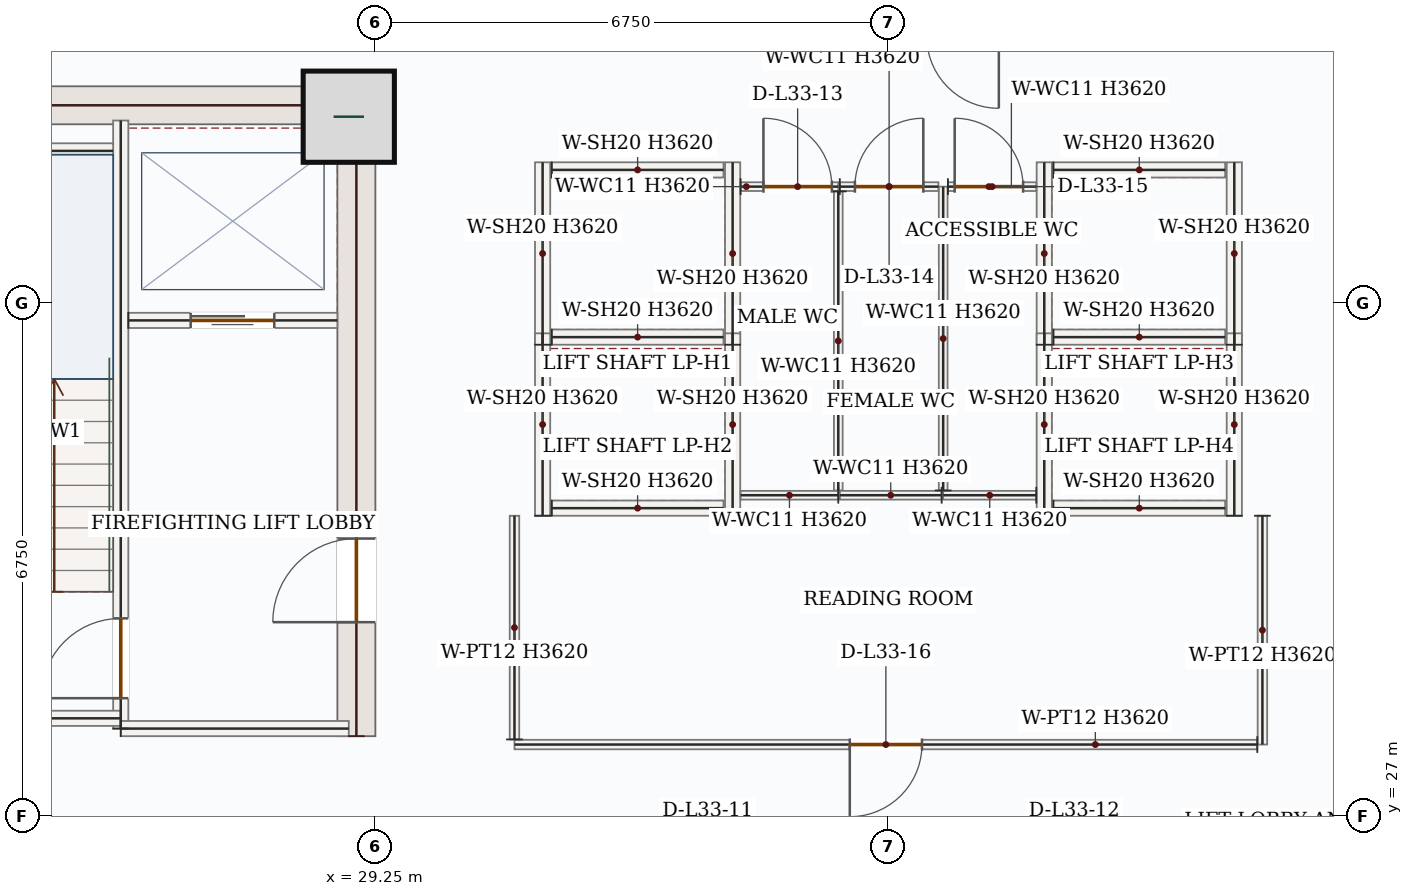
"""IFC4 building model, lengths in metres.
Left out: names, types, materials, properties, quantities, classifications, styles, units other than length and angle.
Written with IfcOpenShell. Run it as: python <this file> out.ifc"""

import sys

from ifc_helpers import new_model, si_unit, direction, frame, frame_2d, origin, origin_2d, place, context, subcontext, project, spatial, rectangle, extrude, source, transform, mapped, element, fill, save


model = new_model("IFC4")
c1 = context("Model", 3, precision=1e-05, world=origin(), true_north=direction((0.0, 1.0)))
c2 = subcontext(c1, "Body", "Model", "MODEL_VIEW")
j1 = project(units=[si_unit("LENGTHUNIT", "METRE"), si_unit("PLANEANGLEUNIT", "RADIAN")], contexts=[c1])
p1 = place(None, origin())
s1 = spatial("IfcSite", under=j1, at=p1, CompositionType="ELEMENT")
p2 = place(p1, origin())
s2 = spatial("IfcBuilding", under=s1, at=p2, CompositionType="ELEMENT")
p3 = place(p2, frame((0.0, 0.0, 147.3)))
s3 = spatial("IfcBuildingStorey", under=s2, at=p3, CompositionType="ELEMENT", Elevation=147.3)
p4 = place(p3, frame((29.0, 28.05, 0.0), z_axis=(0.0, 0.0, 1.0), x_axis=(0.0, 1.0, 0.0)))
e1 = element("IfcWall", 1, at=p4, inside=s3, PredefinedType="SHEAR", context=c2, shape_type="SweptSolid", body=[
    extrude(rectangle(XDim=8.55, YDim=0.5, at=frame_2d((4.275, 0.0))), origin(), (0.0, 0.0, 1.0), 3.62),
])
p5 = place(p4, frame((1.5, 0.0, 0.0)))
e2 = element("IfcOpeningElement", 2, at=p5, cuts=e1, PredefinedType="OPENING", context=c2, shape_type="SweptSolid", body=[
    extrude(rectangle(XDim=1.1, YDim=2.2, at=frame_2d((0.55, 1.1))), frame((0.0, 0.26, 0.0), z_axis=(0.0, -1.0, 0.0), x_axis=(1.0, 0.0, 0.0)), (0.0, 0.0, 1.0), 0.52),
])
m1 = source(origin(), c2, "Body", "SweptSolid", [
    extrude(rectangle(XDim=7.0, YDim=0.5, at=frame_2d((3.5, 0.0))), origin(), (0.0, 0.0, 1.0), 3.62),
])
p6 = place(p3, frame((21.75, 36.35, 0.0), z_axis=(0.0, 0.0, 1.0), x_axis=(1.0, 0.0, 0.0)))
e3 = element("IfcWall", 3, at=p6, inside=s3, PredefinedType="SHEAR", context=c2, shape_type="MappedRepresentation", body=[
    mapped(m1, transform((0.0, 0.0, 0.0), x_axis=(1.0, 0.0, 0.0), y_axis=(0.0, 1.0, 0.0), z_axis=(0.0, 0.0, 1.0), scale=1.0)),
])
m2 = source(origin(), c2, "Body", "SweptSolid", [
    extrude(rectangle(XDim=1.2, YDim=1.2, at=origin_2d()), origin(), (0.0, 0.0, 1.0), 3.9),
])
p7 = place(p3, frame((28.9, 36.2, 0.0), z_axis=(0.0, 0.0, 1.0), x_axis=(1.0, 0.0, 0.0)))
e4 = element("IfcColumn", 4, at=p7, inside=s3, PredefinedType="COLUMN", context=c2, shape_type="MappedRepresentation", body=[
    mapped(m2, transform((0.0, 0.0, 0.0), x_axis=(1.0, 0.0, 0.0), y_axis=(0.0, 1.0, 0.0), z_axis=(0.0, 0.0, 1.0), scale=1.0)),
])
p8 = place(p3, frame((25.9, 28.15, 0.0), z_axis=(0.0, 0.0, 1.0), x_axis=(0.0, 1.0, 0.0)))
e5 = element("IfcWall", 5, at=p8, inside=s3, PredefinedType="SOLIDWALL", context=c2, shape_type="SweptSolid", body=[
    extrude(rectangle(XDim=8.0, YDim=0.2, at=frame_2d((4.0, 0.0))), origin(), (0.0, 0.0, 1.0), 3.62),
])
p9 = place(p8, frame((0.4, 0.0, 0.0)))
e6 = element("IfcOpeningElement", 6, at=p9, cuts=e5, PredefinedType="OPENING", context=c2, shape_type="SweptSolid", body=[
    extrude(rectangle(XDim=1.05, YDim=2.15, at=frame_2d((0.525, 1.075))), frame((0.0, 0.11, 0.0), z_axis=(0.0, -1.0, 0.0), x_axis=(1.0, 0.0, 0.0)), (0.0, 0.0, 1.0), 0.22),
])
m3 = source(origin(), c2, "Body", "SweptSolid", [
    extrude(rectangle(XDim=4.25, YDim=0.2, at=frame_2d((2.125, 0.0))), origin(), (0.0, 0.0, 1.0), 3.62),
])
p10 = place(p3, frame((21.65, 28.285, 0.0), z_axis=(0.0, 0.0, 1.0), x_axis=(1.0, 0.0, 0.0)))
e7 = element("IfcWall", 7, at=p10, inside=s3, PredefinedType="SOLIDWALL", context=c2, shape_type="MappedRepresentation", body=[
    mapped(m3, transform((0.0, 0.0, 0.0), x_axis=(1.0, 0.0, 0.0), y_axis=(0.0, 1.0, 0.0), z_axis=(0.0, 0.0, 1.0), scale=1.0)),
])
m4 = source(origin(), c2, "Body", "SweptSolid", [
    extrude(rectangle(XDim=3.0, YDim=0.2, at=frame_2d((1.5, 0.0))), origin(), (0.0, 0.0, 1.0), 3.62),
])
p11 = place(p3, frame((25.9, 28.15, 0.0), z_axis=(0.0, 0.0, 1.0), x_axis=(1.0, 0.0, 0.0)))
e8 = element("IfcWall", 8, at=p11, inside=s3, PredefinedType="SOLIDWALL", context=c2, shape_type="MappedRepresentation", body=[
    mapped(m4, transform((0.0, 0.0, 0.0), x_axis=(1.0, 0.0, 0.0), y_axis=(0.0, 1.0, 0.0), z_axis=(0.0, 0.0, 1.0), scale=1.0)),
])
m5 = source(origin(), c2, "Body", "SweptSolid", [
    extrude(rectangle(XDim=3.25, YDim=0.2, at=frame_2d((1.625, 0.0))), origin(), (0.0, 0.0, 1.0), 3.62),
])
p12 = place(p3, frame((22.55, 35.75, 0.0), z_axis=(0.0, 0.0, 1.0), x_axis=(1.0, 0.0, 0.0)))
e9 = element("IfcWall", 9, at=p12, inside=s3, PredefinedType="SOLIDWALL", context=c2, shape_type="MappedRepresentation", body=[
    mapped(m5, transform((0.0, 0.0, 0.0), x_axis=(1.0, 0.0, 0.0), y_axis=(0.0, 1.0, 0.0), z_axis=(0.0, 0.0, 1.0), scale=1.0)),
])
p13 = place(p3, frame((26.0, 33.52, 0.0), z_axis=(0.0, 0.0, 1.0), x_axis=(1.0, 0.0, 0.0)))
e10 = element("IfcWall", 10, at=p13, inside=s3, PredefinedType="SOLIDWALL", context=c2, shape_type="SweptSolid", body=[
    extrude(rectangle(XDim=2.75, YDim=0.2, at=frame_2d((1.375, 0.0))), origin(), (0.0, 0.0, 1.0), 3.62),
])
p14 = place(p13, frame((0.82, 0.0, 0.0)))
e11 = element("IfcOpeningElement", 11, at=p14, cuts=e10, PredefinedType="OPENING", context=c2, shape_type="SweptSolid", body=[
    extrude(rectangle(XDim=1.1, YDim=2.15, at=frame_2d((0.55, 1.075))), frame((0.0, 0.11, 0.0), z_axis=(0.0, -1.0, 0.0), x_axis=(1.0, 0.0, 0.0)), (0.0, 0.0, 1.0), 0.22),
])
m6 = source(origin(), c2, "Body", "SweptSolid", [
    extrude(rectangle(XDim=2.4, YDim=0.2, at=frame_2d((1.2, 0.0))), origin(), (0.0, 0.0, 1.0), 3.62),
])
for number, where, z_axis, x_axis in (
    (12, (31.45, 33.2, 0.0), (0.0, 0.0, 1.0), (0.0, 1.0, 0.0)),
    (13, (33.95, 33.2, 0.0), (0.0, 0.0, 1.0), (0.0, 1.0, 0.0)),
):
    element("IfcWall", number, at=place(p3, frame(where, z_axis=z_axis, x_axis=x_axis)), inside=s3, PredefinedType="SOLIDWALL", context=c2, shape_type="MappedRepresentation", body=[
        mapped(m6, transform((0.0, 0.0, 0.0), x_axis=(1.0, 0.0, 0.0), y_axis=(0.0, 1.0, 0.0), z_axis=(0.0, 0.0, 1.0), scale=1.0)),
    ])
m7 = source(origin(), c2, "Body", "SweptSolid", [
    extrude(rectangle(XDim=2.26, YDim=0.2, at=frame_2d((1.13, 0.0))), origin(), (0.0, 0.0, 1.0), 3.62),
])
for number, where, z_axis, x_axis in (
    (14, (31.57, 33.3, 0.0), (0.0, 0.0, 1.0), (1.0, 0.0, 0.0)),
    (15, (31.57, 35.5, 0.0), (0.0, 0.0, 1.0), (1.0, 0.0, 0.0)),
):
    element("IfcWall", number, at=place(p3, frame(where, z_axis=z_axis, x_axis=x_axis)), inside=s3, PredefinedType="SOLIDWALL", context=c2, shape_type="MappedRepresentation", body=[
        mapped(m7, transform((0.0, 0.0, 0.0), x_axis=(1.0, 0.0, 0.0), y_axis=(0.0, 1.0, 0.0), z_axis=(0.0, 0.0, 1.0), scale=1.0)),
    ])
for number, where, z_axis, x_axis in (
    (16, (31.45, 30.95, 0.0), (0.0, 0.0, 1.0), (0.0, 1.0, 0.0)),
    (17, (33.95, 30.95, 0.0), (0.0, 0.0, 1.0), (0.0, 1.0, 0.0)),
):
    element("IfcWall", number, at=place(p3, frame(where, z_axis=z_axis, x_axis=x_axis)), inside=s3, PredefinedType="SOLIDWALL", context=c2, shape_type="MappedRepresentation", body=[
        mapped(m6, transform((0.0, 0.0, 0.0), x_axis=(1.0, 0.0, 0.0), y_axis=(0.0, 1.0, 0.0), z_axis=(0.0, 0.0, 1.0), scale=1.0)),
    ])
p15 = place(p3, frame((31.57, 31.05, 0.0), z_axis=(0.0, 0.0, 1.0), x_axis=(1.0, 0.0, 0.0)))
e18 = element("IfcWall", 18, at=p15, inside=s3, PredefinedType="SOLIDWALL", context=c2, shape_type="MappedRepresentation", body=[
    mapped(m7, transform((0.0, 0.0, 0.0), x_axis=(1.0, 0.0, 0.0), y_axis=(0.0, 1.0, 0.0), z_axis=(0.0, 0.0, 1.0), scale=1.0)),
])
for number, where, z_axis, x_axis in (
    (19, (38.05, 33.2, 0.0), (0.0, 0.0, 1.0), (0.0, 1.0, 0.0)),
    (20, (40.55, 33.2, 0.0), (0.0, 0.0, 1.0), (0.0, 1.0, 0.0)),
):
    element("IfcWall", number, at=place(p3, frame(where, z_axis=z_axis, x_axis=x_axis)), inside=s3, PredefinedType="SOLIDWALL", context=c2, shape_type="MappedRepresentation", body=[
        mapped(m6, transform((0.0, 0.0, 0.0), x_axis=(1.0, 0.0, 0.0), y_axis=(0.0, 1.0, 0.0), z_axis=(0.0, 0.0, 1.0), scale=1.0)),
    ])
for number, where, z_axis, x_axis in (
    (21, (38.17, 33.3, 0.0), (0.0, 0.0, 1.0), (1.0, 0.0, 0.0)),
    (22, (38.17, 35.5, 0.0), (0.0, 0.0, 1.0), (1.0, 0.0, 0.0)),
):
    element("IfcWall", number, at=place(p3, frame(where, z_axis=z_axis, x_axis=x_axis)), inside=s3, PredefinedType="SOLIDWALL", context=c2, shape_type="MappedRepresentation", body=[
        mapped(m7, transform((0.0, 0.0, 0.0), x_axis=(1.0, 0.0, 0.0), y_axis=(0.0, 1.0, 0.0), z_axis=(0.0, 0.0, 1.0), scale=1.0)),
    ])
for number, where, z_axis, x_axis in (
    (23, (38.05, 30.95, 0.0), (0.0, 0.0, 1.0), (0.0, 1.0, 0.0)),
    (24, (40.55, 30.95, 0.0), (0.0, 0.0, 1.0), (0.0, 1.0, 0.0)),
):
    element("IfcWall", number, at=place(p3, frame(where, z_axis=z_axis, x_axis=x_axis)), inside=s3, PredefinedType="SOLIDWALL", context=c2, shape_type="MappedRepresentation", body=[
        mapped(m6, transform((0.0, 0.0, 0.0), x_axis=(1.0, 0.0, 0.0), y_axis=(0.0, 1.0, 0.0), z_axis=(0.0, 0.0, 1.0), scale=1.0)),
    ])
p16 = place(p3, frame((38.17, 31.05, 0.0), z_axis=(0.0, 0.0, 1.0), x_axis=(1.0, 0.0, 0.0)))
e25 = element("IfcWall", 25, at=p16, inside=s3, PredefinedType="SOLIDWALL", context=c2, shape_type="MappedRepresentation", body=[
    mapped(m7, transform((0.0, 0.0, 0.0), x_axis=(1.0, 0.0, 0.0), y_axis=(0.0, 1.0, 0.0), z_axis=(0.0, 0.0, 1.0), scale=1.0)),
])
m8 = source(origin(), c2, "Body", "SweptSolid", [
    extrude(rectangle(XDim=1.225, YDim=0.115, at=frame_2d((0.613, 0.0))), origin(), (0.0, 0.0, 1.0), 3.62),
])
p17 = place(p3, frame((37.945, 31.22, 0.0), z_axis=(0.0, 0.0, 1.0), x_axis=(-1.0, 0.0, 0.0)))
e26 = element("IfcWall", 26, at=p17, inside=s3, PredefinedType="PARTITIONING", context=c2, shape_type="MappedRepresentation", body=[
    mapped(m8, transform((0.0, 0.0, 0.0), x_axis=(1.0, 0.0, 0.0), y_axis=(0.0, 1.0, 0.0), z_axis=(0.0, 0.0, 1.0), scale=1.0)),
])
m9 = source(origin(), c2, "Body", "SweptSolid", [
    extrude(rectangle(XDim=3.998, YDim=0.115, at=frame_2d((1.999, 0.0))), origin(), (0.0, 0.0, 1.0), 3.62),
])
p18 = place(p3, frame((36.72, 31.282, 0.0), z_axis=(0.0, 0.0, 1.0), x_axis=(0.0, 1.0, 0.0)))
e27 = element("IfcWall", 27, at=p18, inside=s3, PredefinedType="PARTITIONING", context=c2, shape_type="MappedRepresentation", body=[
    mapped(m9, transform((0.0, 0.0, 0.0), x_axis=(1.0, 0.0, 0.0), y_axis=(0.0, 1.0, 0.0), z_axis=(0.0, 0.0, 1.0), scale=1.0)),
])
p19 = place(p3, frame((36.782, 35.28, 0.0), z_axis=(0.0, 0.0, 1.0), x_axis=(1.0, 0.0, 0.0)))
e28 = element("IfcWall", 28, at=p19, inside=s3, PredefinedType="PARTITIONING", context=c2, shape_type="SweptSolid", body=[
    extrude(rectangle(XDim=1.163, YDim=0.115, at=frame_2d((0.581, 0.0))), origin(), (0.0, 0.0, 1.0), 3.62),
])
p20 = place(p19, frame((0.089, 0.0, 0.0)))
e29 = element("IfcOpeningElement", 29, at=p20, cuts=e28, PredefinedType="OPENING", context=c2, shape_type="SweptSolid", body=[
    extrude(rectangle(XDim=0.9, YDim=2.1, at=frame_2d((0.45, 1.05))), frame((0.0, 0.067, 0.0), z_axis=(0.0, -1.0, 0.0), x_axis=(1.0, 0.0, 0.0)), (0.0, 0.0, 1.0), 0.135),
])
m10 = source(origin(), c2, "Body", "SweptSolid", [
    extrude(rectangle(XDim=1.285, YDim=0.115, at=frame_2d((0.643, 0.0))), origin(), (0.0, 0.0, 1.0), 3.62),
])
p21 = place(p3, frame((35.34, 31.22, 0.0), z_axis=(0.0, 0.0, 1.0), x_axis=(-1.0, 0.0, 0.0)))
e30 = element("IfcWall", 30, at=p21, inside=s3, PredefinedType="PARTITIONING", context=c2, shape_type="MappedRepresentation", body=[
    mapped(m10, transform((0.0, 0.0, 0.0), x_axis=(1.0, 0.0, 0.0), y_axis=(0.0, 1.0, 0.0), z_axis=(0.0, 0.0, 1.0), scale=1.0)),
])
p22 = place(p3, frame((34.055, 35.28, 0.0), z_axis=(0.0, 0.0, 1.0), x_axis=(1.0, 0.0, 0.0)))
e31 = element("IfcWall", 31, at=p22, inside=s3, PredefinedType="PARTITIONING", context=c2, shape_type="SweptSolid", body=[
    extrude(rectangle(XDim=1.285, YDim=0.115, at=frame_2d((0.643, 0.0))), origin(), (0.0, 0.0, 1.0), 3.62),
])
p23 = place(p22, frame((0.3, 0.0, 0.0)))
e32 = element("IfcOpeningElement", 32, at=p23, cuts=e31, PredefinedType="OPENING", context=c2, shape_type="SweptSolid", body=[
    extrude(rectangle(XDim=0.9, YDim=2.1, at=frame_2d((0.45, 1.05))), frame((0.0, 0.067, 0.0), z_axis=(0.0, -1.0, 0.0), x_axis=(1.0, 0.0, 0.0)), (0.0, 0.0, 1.0), 0.135),
])
m11 = source(origin(), c2, "Body", "SweptSolid", [
    extrude(rectangle(XDim=3.935, YDim=0.115, at=frame_2d((1.968, 0.0))), origin(), (0.0, 0.0, 1.0), 3.62),
])
p24 = place(p3, frame((35.34, 35.218, 0.0), z_axis=(0.0, 0.0, 1.0), x_axis=(0.0, -1.0, 0.0)))
e33 = element("IfcWall", 33, at=p24, inside=s3, PredefinedType="PARTITIONING", context=c2, shape_type="MappedRepresentation", body=[
    mapped(m11, transform((0.0, 0.0, 0.0), x_axis=(1.0, 0.0, 0.0), y_axis=(0.0, 1.0, 0.0), z_axis=(0.0, 0.0, 1.0), scale=1.0)),
])
m12 = source(origin(), c2, "Body", "SweptSolid", [
    extrude(rectangle(XDim=1.34, YDim=0.115, at=frame_2d((0.67, 0.0))), origin(), (0.0, 0.0, 1.0), 3.62),
])
p25 = place(p3, frame((36.7, 31.22, 0.0), z_axis=(0.0, 0.0, 1.0), x_axis=(-1.0, 0.0, 0.0)))
e34 = element("IfcWall", 34, at=p25, inside=s3, PredefinedType="PARTITIONING", context=c2, shape_type="MappedRepresentation", body=[
    mapped(m12, transform((0.0, 0.0, 0.0), x_axis=(1.0, 0.0, 0.0), y_axis=(0.0, 1.0, 0.0), z_axis=(0.0, 0.0, 1.0), scale=1.0)),
])
p26 = place(p3, frame((35.36, 35.28, 0.0), z_axis=(0.0, 0.0, 1.0), x_axis=(1.0, 0.0, 0.0)))
e35 = element("IfcWall", 35, at=p26, inside=s3, PredefinedType="PARTITIONING", context=c2, shape_type="SweptSolid", body=[
    extrude(rectangle(XDim=1.297, YDim=0.115, at=frame_2d((0.649, 0.0))), origin(), (0.0, 0.0, 1.0), 3.62),
])
p27 = place(p26, frame((0.199, 0.0, 0.0)))
e36 = element("IfcOpeningElement", 36, at=p27, cuts=e35, PredefinedType="OPENING", context=c2, shape_type="SweptSolid", body=[
    extrude(rectangle(XDim=0.9, YDim=2.1, at=frame_2d((0.45, 1.05))), frame((0.0, 0.067, 0.0), z_axis=(0.0, -1.0, 0.0), x_axis=(1.0, 0.0, 0.0)), (0.0, 0.0, 1.0), 0.135),
])
m13 = source(origin(), c2, "Body", "SweptSolid", [
    extrude(rectangle(XDim=3.01, YDim=0.125, at=frame_2d((1.505, 0.0))), origin(), (0.0, 0.0, 1.0), 3.62),
])
p28 = place(p3, frame((40.92, 30.95, 0.0), z_axis=(0.0, 0.0, 1.0), x_axis=(0.0, -1.0, 0.0)))
e37 = element("IfcWall", 37, at=p28, inside=s3, PredefinedType="PARTITIONING", context=c2, shape_type="MappedRepresentation", body=[
    mapped(m13, transform((0.0, 0.0, 0.0), x_axis=(1.0, 0.0, 0.0), y_axis=(0.0, 1.0, 0.0), z_axis=(0.0, 0.0, 1.0), scale=1.0)),
])
p29 = place(p3, frame((40.853, 27.94, 0.0), z_axis=(0.0, 0.0, 1.0), x_axis=(-1.0, 0.0, 0.0)))
e38 = element("IfcWall", 38, at=p29, inside=s3, PredefinedType="PARTITIONING", context=c2, shape_type="SweptSolid", body=[
    extrude(rectangle(XDim=9.772, YDim=0.125, at=frame_2d((4.886, 0.0))), origin(), (0.0, 0.0, 1.0), 3.62),
])
p30 = place(p29, frame((4.411, 0.0, 0.0)))
e39 = element("IfcOpeningElement", 39, at=p30, cuts=e38, PredefinedType="OPENING", context=c2, shape_type="SweptSolid", body=[
    extrude(rectangle(XDim=0.95, YDim=2.15, at=frame_2d((0.475, 1.075))), frame((0.0, 0.073, 0.0), z_axis=(0.0, -1.0, 0.0), x_axis=(1.0, 0.0, 0.0)), (0.0, 0.0, 1.0), 0.145),
])
m14 = source(origin(), c2, "Body", "SweptSolid", [
    extrude(rectangle(XDim=2.942, YDim=0.125, at=frame_2d((1.471, 0.0))), origin(), (0.0, 0.0, 1.0), 3.62),
])
p31 = place(p3, frame((31.08, 28.008, 0.0), z_axis=(0.0, 0.0, 1.0), x_axis=(0.0, 1.0, 0.0)))
e40 = element("IfcWall", 40, at=p31, inside=s3, PredefinedType="PARTITIONING", context=c2, shape_type="MappedRepresentation", body=[
    mapped(m14, transform((0.0, 0.0, 0.0), x_axis=(1.0, 0.0, 0.0), y_axis=(0.0, 1.0, 0.0), z_axis=(0.0, 0.0, 1.0), scale=1.0)),
])
m15 = source(origin(), c2, "Body", "SweptSolid", [
    extrude(rectangle(XDim=1.05, YDim=2.15, at=frame_2d((0.525, 1.075))), frame((0.0, 0.025, 0.0), z_axis=(0.0, -1.0, 0.0), x_axis=(1.0, 0.0, 0.0)), (0.0, 0.0, 1.0), 0.05),
])
p32 = place(p9, origin())
e41 = element("IfcDoor", 41, at=p32, inside=s3, OperationType="SINGLE_SWING_LEFT", PredefinedType="DOOR", context=c2, shape_type="MappedRepresentation", body=[
    mapped(m15, transform((0.0, 0.0, 0.0), x_axis=(1.0, 0.0, 0.0), y_axis=(0.0, 1.0, 0.0), z_axis=(0.0, 0.0, 1.0), scale=1.0)),
])
fill(e6, e41)
m16 = source(origin(), c2, "Body", "SweptSolid", [
    extrude(rectangle(XDim=1.1, YDim=2.15, at=frame_2d((0.55, 1.075))), frame((0.0, 0.025, 0.0), z_axis=(0.0, -1.0, 0.0), x_axis=(1.0, 0.0, 0.0)), (0.0, 0.0, 1.0), 0.05),
])
p33 = place(p14, origin())
e42 = element("IfcDoor", 42, at=p33, inside=s3, OperationType="DOUBLE_DOOR_SLIDING", PredefinedType="DOOR", context=c2, shape_type="MappedRepresentation", body=[
    mapped(m16, transform((0.0, 0.0, 0.0), x_axis=(1.0, 0.0, 0.0), y_axis=(0.0, 1.0, 0.0), z_axis=(0.0, 0.0, 1.0), scale=1.0)),
])
fill(e11, e42)
m17 = source(origin(), c2, "Body", "SweptSolid", [
    extrude(rectangle(XDim=1.1, YDim=2.2, at=frame_2d((0.55, 1.1))), frame((0.0, 0.025, 0.0), z_axis=(0.0, -1.0, 0.0), x_axis=(1.0, 0.0, 0.0)), (0.0, 0.0, 1.0), 0.05),
])
p34 = place(p5, origin())
e43 = element("IfcDoor", 43, at=p34, inside=s3, OperationType="SINGLE_SWING_LEFT", PredefinedType="DOOR", context=c2, shape_type="MappedRepresentation", body=[
    mapped(m17, transform((0.0, 0.0, 0.0), x_axis=(1.0, 0.0, 0.0), y_axis=(0.0, 1.0, 0.0), z_axis=(0.0, 0.0, 1.0), scale=1.0)),
])
fill(e2, e43)
m18 = source(origin(), c2, "Body", "SweptSolid", [
    extrude(rectangle(XDim=0.9, YDim=2.1, at=frame_2d((0.45, 1.05))), frame((0.0, 0.025, 0.0), z_axis=(0.0, -1.0, 0.0), x_axis=(1.0, 0.0, 0.0)), (0.0, 0.0, 1.0), 0.05),
])
p35 = place(p23, origin())
e44 = element("IfcDoor", 44, at=p35, inside=s3, OperationType="SINGLE_SWING_LEFT", PredefinedType="DOOR", context=c2, shape_type="MappedRepresentation", body=[
    mapped(m18, transform((0.0, 0.0, 0.0), x_axis=(1.0, 0.0, 0.0), y_axis=(0.0, 1.0, 0.0), z_axis=(0.0, 0.0, 1.0), scale=1.0)),
])
fill(e32, e44)
p36 = place(p27, origin())
e45 = element("IfcDoor", 45, at=p36, inside=s3, OperationType="SINGLE_SWING_RIGHT", PredefinedType="DOOR", context=c2, shape_type="MappedRepresentation", body=[
    mapped(m18, transform((0.0, 0.0, 0.0), x_axis=(1.0, 0.0, 0.0), y_axis=(0.0, 1.0, 0.0), z_axis=(0.0, 0.0, 1.0), scale=1.0)),
])
fill(e36, e45)
p37 = place(p20, origin())
e46 = element("IfcDoor", 46, at=p37, inside=s3, OperationType="SINGLE_SWING_LEFT", PredefinedType="DOOR", context=c2, shape_type="MappedRepresentation", body=[
    mapped(m18, transform((0.0, 0.0, 0.0), x_axis=(1.0, 0.0, 0.0), y_axis=(0.0, 1.0, 0.0), z_axis=(0.0, 0.0, 1.0), scale=1.0)),
])
fill(e29, e46)
m19 = source(origin(), c2, "Body", "SweptSolid", [
    extrude(rectangle(XDim=0.95, YDim=2.15, at=frame_2d((0.475, 1.075))), frame((0.0, 0.025, 0.0), z_axis=(0.0, -1.0, 0.0), x_axis=(1.0, 0.0, 0.0)), (0.0, 0.0, 1.0), 0.05),
])
p38 = place(p30, origin())
e47 = element("IfcDoor", 47, at=p38, inside=s3, OperationType="SINGLE_SWING_RIGHT", PredefinedType="DOOR", context=c2, shape_type="MappedRepresentation", body=[
    mapped(m19, transform((0.0, 0.0, 0.0), x_axis=(1.0, 0.0, 0.0), y_axis=(0.0, 1.0, 0.0), z_axis=(0.0, 0.0, 1.0), scale=1.0)),
])
fill(e39, e47)
save(model, sys.argv[1])
